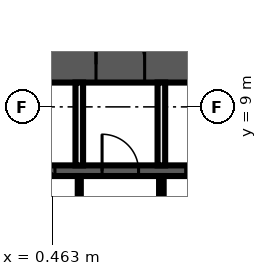
"""IFC4 building model, lengths in metres.
Left out: names, types, materials, properties, quantities, classifications, styles, units other than length and angle.
Written with IfcOpenShell. Run it as: python <this file> out.ifc"""

import sys

from ifc_helpers import new_model, si_unit, direction, frame, frame_2d, origin, place, context, subcontext, project, spatial, rectangle, extrude, element, fill, save


model = new_model("IFC4")
c1 = context("Model", 3, precision=1e-05, world=origin(), true_north=direction((0.0, 1.0)))
c2 = subcontext(c1, "Body", "Model", "MODEL_VIEW")
j1 = project(units=[si_unit("LENGTHUNIT", "METRE"), si_unit("PLANEANGLEUNIT", "RADIAN")], contexts=[c1])
p1 = place(None, origin())
s1 = spatial("IfcSite", under=j1, at=p1, CompositionType="ELEMENT")
p2 = place(p1, origin())
s2 = spatial("IfcBuilding", under=s1, at=p2, CompositionType="ELEMENT")
p3 = place(p2, frame((0.0, 0.0, 27.0)))
s3 = spatial("IfcBuildingStorey", under=s2, at=p3, CompositionType="ELEMENT", Elevation=27.0)
p4 = place(p3, frame((-14.0, 10.4, 0.0), z_axis=(0.0, 0.0, 1.0), x_axis=(1.0, 0.0, 0.0)))
e1 = element("IfcWall", 1, at=p4, inside=s3, PredefinedType="SHEAR", context=c2, shape_type="SweptSolid", body=[
    extrude(rectangle(XDim=28.0, YDim=1.2, at=frame_2d((14.0, 0.0))), origin(), (0.0, 0.0, 1.0), 5.55),
])
p5 = place(p4, frame((15.9, 0.0, 0.0)))
e2 = element("IfcOpeningElement", 2, at=p5, cuts=e1, PredefinedType="OPENING", context=c2, shape_type="SweptSolid", body=[
    extrude(rectangle(XDim=1.6, YDim=2.1, at=frame_2d((0.8, 1.05))), frame((0.0, 0.61, 0.0), z_axis=(0.0, -1.0, 0.0), x_axis=(1.0, 0.0, 0.0)), (0.0, 0.0, 1.0), 1.22),
])
p6 = place(p3, frame((-9.45, 6.9, 0.0), z_axis=(0.0, 0.0, 1.0), x_axis=(1.0, 0.0, 0.0)))
e3 = element("IfcWall", 3, at=p6, inside=s3, PredefinedType="SHEAR", context=c2, shape_type="SweptSolid", body=[
    extrude(rectangle(XDim=18.9, YDim=0.35, at=frame_2d((9.45, 0.0))), origin(), (0.0, 0.0, 1.0), 5.55),
])
p7 = place(p6, frame((0.8, 0.0, 0.0)))
e4 = element("IfcOpeningElement", 4, at=p7, cuts=e3, PredefinedType="OPENING", context=c2, shape_type="SweptSolid", body=[
    extrude(rectangle(XDim=1.1, YDim=2.1, at=frame_2d((0.55, 1.05))), frame((0.0, 0.185, 0.0), z_axis=(0.0, -1.0, 0.0), x_axis=(1.0, 0.0, 0.0)), (0.0, 0.0, 1.0), 0.37),
])
p8 = place(p6, frame((3.5, 0.0, 0.0)))
e5 = element("IfcOpeningElement", 5, at=p8, cuts=e3, PredefinedType="OPENING", context=c2, shape_type="SweptSolid", body=[
    extrude(rectangle(XDim=1.1, YDim=2.1, at=frame_2d((0.55, 1.05))), frame((0.0, 0.185, 0.0), z_axis=(0.0, -1.0, 0.0), x_axis=(1.0, 0.0, 0.0)), (0.0, 0.0, 1.0), 0.37),
])
p9 = place(p6, frame((6.2, 0.0, 0.0)))
e6 = element("IfcOpeningElement", 6, at=p9, cuts=e3, PredefinedType="OPENING", context=c2, shape_type="SweptSolid", body=[
    extrude(rectangle(XDim=1.1, YDim=2.1, at=frame_2d((0.55, 1.05))), frame((0.0, 0.185, 0.0), z_axis=(0.0, -1.0, 0.0), x_axis=(1.0, 0.0, 0.0)), (0.0, 0.0, 1.0), 0.37),
])
p10 = place(p6, frame((8.9, 0.0, 0.0)))
e7 = element("IfcOpeningElement", 7, at=p10, cuts=e3, PredefinedType="OPENING", context=c2, shape_type="SweptSolid", body=[
    extrude(rectangle(XDim=1.1, YDim=2.1, at=frame_2d((0.55, 1.05))), frame((0.0, 0.185, 0.0), z_axis=(0.0, -1.0, 0.0), x_axis=(1.0, 0.0, 0.0)), (0.0, 0.0, 1.0), 0.37),
])
p11 = place(p6, frame((11.55, 0.0, 0.0)))
e8 = element("IfcOpeningElement", 8, at=p11, cuts=e3, PredefinedType="OPENING", context=c2, shape_type="SweptSolid", body=[
    extrude(rectangle(XDim=1.2, YDim=2.1, at=frame_2d((0.6, 1.05))), frame((0.0, 0.185, 0.0), z_axis=(0.0, -1.0, 0.0), x_axis=(1.0, 0.0, 0.0)), (0.0, 0.0, 1.0), 0.37),
])
p12 = place(p6, frame((14.3, 0.0, 0.0)))
e9 = element("IfcOpeningElement", 9, at=p12, cuts=e3, PredefinedType="OPENING", context=c2, shape_type="SweptSolid", body=[
    extrude(rectangle(XDim=1.1, YDim=2.1, at=frame_2d((0.55, 1.05))), frame((0.0, 0.185, 0.0), z_axis=(0.0, -1.0, 0.0), x_axis=(1.0, 0.0, 0.0)), (0.0, 0.0, 1.0), 0.37),
])
p13 = place(p6, frame((17.0, 0.0, 0.0)))
e10 = element("IfcOpeningElement", 10, at=p13, cuts=e3, PredefinedType="OPENING", context=c2, shape_type="SweptSolid", body=[
    extrude(rectangle(XDim=1.1, YDim=2.1, at=frame_2d((0.55, 1.05))), frame((0.0, 0.185, 0.0), z_axis=(0.0, -1.0, 0.0), x_axis=(1.0, 0.0, 0.0)), (0.0, 0.0, 1.0), 0.37),
])
p14 = place(p3, frame((4.05, 6.725, 0.0), z_axis=(0.0, 0.0, 1.0), x_axis=(0.0, -1.0, 0.0)))
e11 = element("IfcWall", 11, at=p14, inside=s3, PredefinedType="PARTITIONING", context=c2, shape_type="SweptSolid", body=[
    extrude(rectangle(XDim=3.25, YDim=0.15, at=frame_2d((1.625, 0.0))), origin(), (0.0, 0.0, 1.0), 5.55),
])
p15 = place(p14, frame((1.025, 0.0, 0.0)))
e12 = element("IfcOpeningElement", 12, at=p15, cuts=e11, PredefinedType="OPENING", context=c2, shape_type="SweptSolid", body=[
    extrude(rectangle(XDim=1.2, YDim=2.1, at=frame_2d((0.6, 1.05))), frame((0.0, 0.085, 0.0), z_axis=(0.0, -1.0, 0.0), x_axis=(1.0, 0.0, 0.0)), (0.0, 0.0, 1.0), 0.17),
])
p16 = place(p3, frame((4.05, 7.075, 0.0), z_axis=(0.0, 0.0, 1.0), x_axis=(0.0, 1.0, 0.0)))
e13 = element("IfcWall", 13, at=p16, inside=s3, PredefinedType="SOLIDWALL", context=c2, shape_type="SweptSolid", body=[
    extrude(rectangle(XDim=2.725, YDim=0.25, at=frame_2d((1.363, 0.0))), origin(), (0.0, 0.0, 1.0), 5.55),
])
p17 = place(p3, frame((1.35, 6.725, 0.0), z_axis=(0.0, 0.0, 1.0), x_axis=(0.0, -1.0, 0.0)))
e14 = element("IfcWall", 14, at=p17, inside=s3, PredefinedType="PARTITIONING", context=c2, shape_type="SweptSolid", body=[
    extrude(rectangle(XDim=3.25, YDim=0.1, at=frame_2d((1.625, 0.0))), origin(), (0.0, 0.0, 1.0), 5.55),
])
p18 = place(p17, frame((1.025, 0.0, 0.0)))
e15 = element("IfcOpeningElement", 15, at=p18, cuts=e14, PredefinedType="OPENING", context=c2, shape_type="SweptSolid", body=[
    extrude(rectangle(XDim=1.2, YDim=2.1, at=frame_2d((0.6, 1.05))), frame((0.0, 0.06, 0.0), z_axis=(0.0, -1.0, 0.0), x_axis=(1.0, 0.0, 0.0)), (0.0, 0.0, 1.0), 0.12),
])
p19 = place(p3, frame((1.35, 7.075, 0.0), z_axis=(0.0, 0.0, 1.0), x_axis=(0.0, 1.0, 0.0)))
e16 = element("IfcWall", 16, at=p19, inside=s3, PredefinedType="SOLIDWALL", context=c2, shape_type="SweptSolid", body=[
    extrude(rectangle(XDim=2.725, YDim=0.25, at=frame_2d((1.363, 0.0))), origin(), (0.0, 0.0, 1.0), 5.55),
])
p20 = place(p10, origin())
e17 = element("IfcDoor", 17, at=p20, inside=s3, OperationType="DOUBLE_DOOR_SLIDING", PredefinedType="DOOR", context=c2, shape_type="SweptSolid", body=[
    extrude(rectangle(XDim=1.1, YDim=2.1, at=frame_2d((0.55, 1.05))), frame((0.0, 0.025, 0.0), z_axis=(0.0, -1.0, 0.0), x_axis=(1.0, 0.0, 0.0)), (0.0, 0.0, 1.0), 0.05),
])
fill(e7, e17)
p21 = place(p5, origin())
e18 = element("IfcDoor", 18, at=p21, inside=s3, OperationType="DOUBLE_DOOR_SINGLE_SWING", PredefinedType="DOOR", context=c2, shape_type="SweptSolid", body=[
    extrude(rectangle(XDim=1.6, YDim=2.1, at=frame_2d((0.8, 1.05))), frame((0.0, 0.025, 0.0), z_axis=(0.0, -1.0, 0.0), x_axis=(1.0, 0.0, 0.0)), (0.0, 0.0, 1.0), 0.05),
])
fill(e2, e18)
p22 = place(p11, origin())
e19 = element("IfcDoor", 19, at=p22, inside=s3, OperationType="SINGLE_SWING_LEFT", PredefinedType="DOOR", context=c2, shape_type="SweptSolid", body=[
    extrude(rectangle(XDim=1.2, YDim=2.1, at=frame_2d((0.6, 1.05))), frame((0.0, 0.025, 0.0), z_axis=(0.0, -1.0, 0.0), x_axis=(1.0, 0.0, 0.0)), (0.0, 0.0, 1.0), 0.05),
])
fill(e8, e19)
p23 = place(p12, origin())
e20 = element("IfcDoor", 20, at=p23, inside=s3, OperationType="DOUBLE_DOOR_SLIDING", PredefinedType="DOOR", context=c2, shape_type="SweptSolid", body=[
    extrude(rectangle(XDim=1.1, YDim=2.1, at=frame_2d((0.55, 1.05))), frame((0.0, 0.025, 0.0), z_axis=(0.0, -1.0, 0.0), x_axis=(1.0, 0.0, 0.0)), (0.0, 0.0, 1.0), 0.05),
])
fill(e9, e20)
save(model, sys.argv[1])
